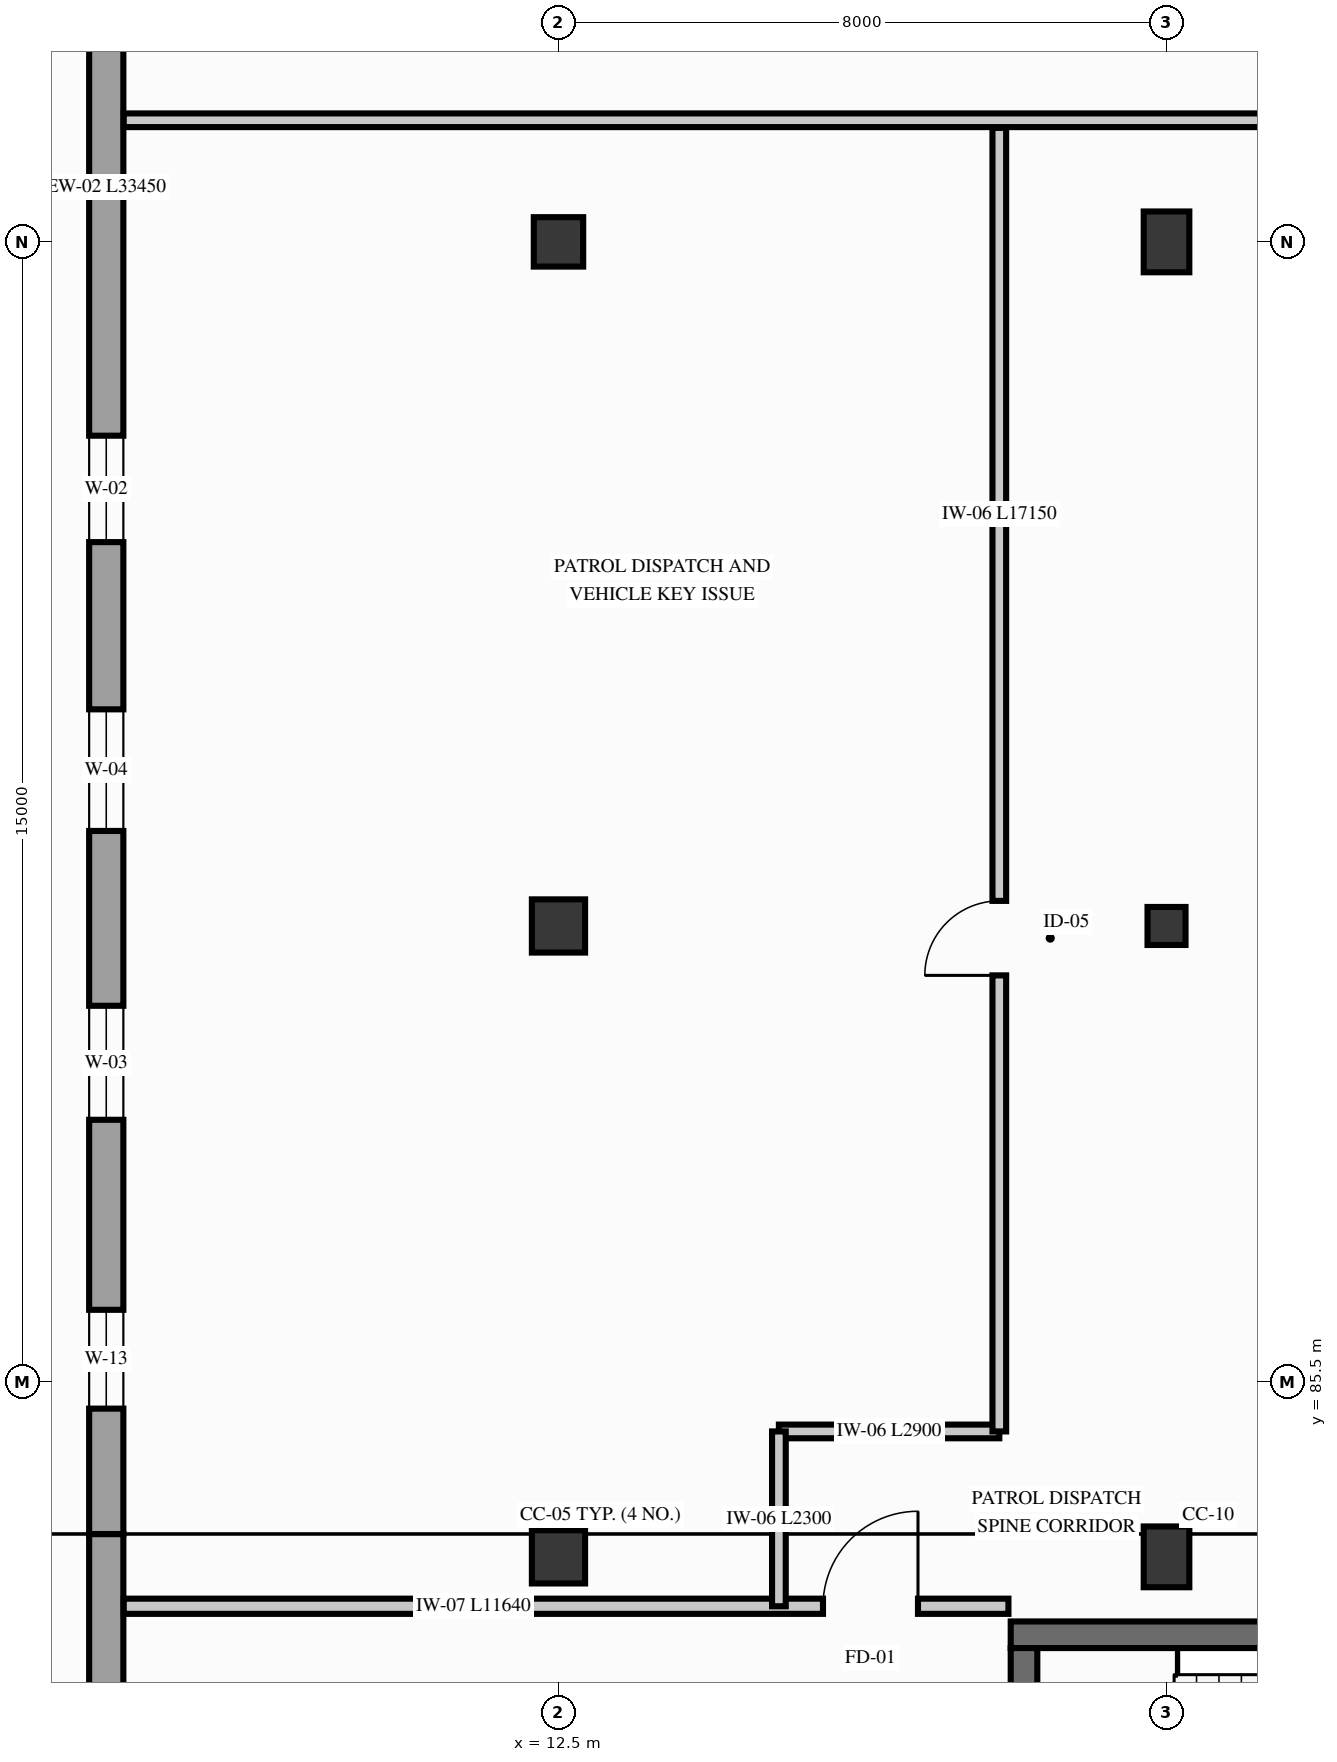
"""IFC4 building model, lengths in metres.
Left out: names, types, materials, properties, quantities, classifications, styles, units other than length and angle.
Written with IfcOpenShell. Run it as: python <this file> out.ifc"""

import sys

from ifc_helpers import new_model, si_unit, direction, frame, frame_2d, origin, origin_2d, place, context, subcontext, project, spatial, rectangle, extrude, element, fill, save


model = new_model("IFC4")
c1 = context("Model", 3, precision=1e-05, world=origin(), true_north=direction((0.0, 1.0)))
c2 = subcontext(c1, "Body", "Model", "MODEL_VIEW")
j1 = project(units=[si_unit("LENGTHUNIT", "METRE"), si_unit("PLANEANGLEUNIT", "RADIAN")], contexts=[c1])
p1 = place(None, origin())
s1 = spatial("IfcSite", under=j1, at=p1, CompositionType="ELEMENT")
p2 = place(p1, origin())
s2 = spatial("IfcBuilding", under=s1, at=p2, CompositionType="ELEMENT")
p3 = place(p2, origin())
s3 = spatial("IfcBuildingStorey", under=s2, at=p3, CompositionType="ELEMENT", Elevation=0.0)
p4 = place(p3, frame((18.45, 82.175, 0.0), z_axis=(0.0, 0.0, 1.0), x_axis=(1.0, 0.0, 0.0)))
e1 = element("IfcWall", 1, at=p4, inside=s3, PredefinedType="SHEAR", context=c2, shape_type="SweptSolid", body=[
    extrude(rectangle(XDim=8.3, YDim=0.35, at=frame_2d((4.15, 0.0))), origin(), (0.0, 0.0, 1.0), 4.88),
])
p5 = place(p3, frame((18.625, 75.2, 0.0), z_axis=(0.0, 0.0, 1.0), x_axis=(0.0, 1.0, 0.0)))
e2 = element("IfcWall", 2, at=p5, inside=s3, PredefinedType="SHEAR", context=c2, shape_type="SweptSolid", body=[
    extrude(rectangle(XDim=6.8, YDim=0.35, at=frame_2d((3.4, 0.0))), origin(), (0.0, 0.0, 1.0), 4.88),
])
p6 = place(p5, frame((2.6, 0.0, 0.0)))
e3 = element("IfcOpeningElement", 3, at=p6, cuts=e2, PredefinedType="OPENING", context=c2, shape_type="SweptSolid", body=[
    extrude(rectangle(XDim=1.32, YDim=2.24, at=frame_2d((0.66, 1.12))), frame((0.0, 0.185, 0.0), z_axis=(0.0, -1.0, 0.0), x_axis=(1.0, 0.0, 0.0)), (0.0, 0.0, 1.0), 0.37),
])
p7 = place(p3, frame((12.5, 83.2, 0.0), z_axis=(0.0, 0.0, 1.0), x_axis=(1.0, 0.0, 0.0)))
e4 = element("IfcColumn", 4, at=p7, inside=s3, PredefinedType="COLUMN", context=c2, shape_type="SweptSolid", body=[
    extrude(rectangle(XDim=0.7, YDim=0.7, at=origin_2d()), origin(), (0.0, 0.0, 1.0), 5.1),
])
p8 = place(p3, frame((20.5, 83.2, 0.0), z_axis=(0.0, 0.0, 1.0), x_axis=(1.0, 0.0, 0.0)))
e5 = element("IfcColumn", 5, at=p8, inside=s3, PredefinedType="COLUMN", context=c2, shape_type="SweptSolid", body=[
    extrude(rectangle(XDim=0.6, YDim=0.8, at=origin_2d()), origin(), (0.0, 0.0, 1.0), 5.1),
])
p9 = place(p3, frame((12.5, 91.5, 0.0), z_axis=(0.0, 0.0, 1.0), x_axis=(1.0, 0.0, 0.0)))
e6 = element("IfcColumn", 6, at=p9, inside=s3, PredefinedType="COLUMN", context=c2, shape_type="SweptSolid", body=[
    extrude(rectangle(XDim=0.7, YDim=0.7, at=origin_2d()), origin(), (0.0, 0.0, 1.0), 5.1),
])
p10 = place(p3, frame((12.5, 100.5, 0.0), z_axis=(0.0, 0.0, 1.0), x_axis=(1.0, 0.0, 0.0)))
e7 = element("IfcColumn", 7, at=p10, inside=s3, PredefinedType="COLUMN", context=c2, shape_type="SweptSolid", body=[
    extrude(rectangle(XDim=0.65, YDim=0.65, at=origin_2d()), origin(), (0.0, 0.0, 1.0), 5.1),
])
p11 = place(p3, frame((20.5, 91.5, 0.0), z_axis=(0.0, 0.0, 1.0), x_axis=(1.0, 0.0, 0.0)))
e8 = element("IfcColumn", 8, at=p11, inside=s3, PredefinedType="COLUMN", context=c2, shape_type="SweptSolid", body=[
    extrude(rectangle(XDim=0.5, YDim=0.5, at=origin_2d()), origin(), (0.0, 0.0, 1.0), 5.1),
])
p12 = place(p3, frame((20.5, 100.5, 0.0), z_axis=(0.0, 0.0, 1.0), x_axis=(1.0, 0.0, 0.0)))
e9 = element("IfcColumn", 9, at=p12, inside=s3, PredefinedType="COLUMN", context=c2, shape_type="SweptSolid", body=[
    extrude(rectangle(XDim=0.6, YDim=0.8, at=origin_2d()), origin(), (0.0, 0.0, 1.0), 5.1),
])
p13 = place(p3, frame((6.55, 36.5, 0.0), z_axis=(0.0, 0.0, 1.0), x_axis=(0.0, 1.0, 0.0)))
e10 = element("IfcWall", 10, at=p13, inside=s3, PredefinedType="SOLIDWALL", context=c2, shape_type="SweptSolid", body=[
    extrude(rectangle(XDim=47.0, YDim=0.45, at=frame_2d((23.5, 0.0))), origin(), (0.0, 0.0, 1.0), 4.368),
])
p14 = place(p13, frame((40.5, 0.0, 0.0)))
e11 = element("IfcOpeningElement", 11, at=p14, cuts=e10, PredefinedType="OPENING", context=c2, shape_type="SweptSolid", body=[
    extrude(rectangle(XDim=1.8, YDim=2.4, at=frame_2d((0.9, 1.2))), frame((0.0, 0.235, 0.0), z_axis=(0.0, -1.0, 0.0), x_axis=(1.0, 0.0, 0.0)), (0.0, 0.0, 1.0), 0.47),
])
p15 = place(p13, frame((1.65, 0.0, 0.85)))
e12 = element("IfcOpeningElement", 12, at=p15, cuts=e10, PredefinedType="OPENING", context=c2, shape_type="SweptSolid", body=[
    extrude(rectangle(XDim=1.6, YDim=2.4, at=frame_2d((0.8, 1.2))), frame((0.0, 0.235, 0.0), z_axis=(0.0, -1.0, 0.0), x_axis=(1.0, 0.0, 0.0)), (0.0, 0.0, 1.0), 0.47),
])
p16 = place(p13, frame((5.5, 0.0, 0.85)))
e13 = element("IfcOpeningElement", 13, at=p16, cuts=e10, PredefinedType="OPENING", context=c2, shape_type="SweptSolid", body=[
    extrude(rectangle(XDim=1.8, YDim=2.4, at=frame_2d((0.9, 1.2))), frame((0.0, 0.235, 0.0), z_axis=(0.0, -1.0, 0.0), x_axis=(1.0, 0.0, 0.0)), (0.0, 0.0, 1.0), 0.47),
])
p17 = place(p13, frame((9.35, 0.0, 0.85)))
e14 = element("IfcOpeningElement", 14, at=p17, cuts=e10, PredefinedType="OPENING", context=c2, shape_type="SweptSolid", body=[
    extrude(rectangle(XDim=1.5, YDim=2.3, at=frame_2d((0.75, 1.15))), frame((0.0, 0.235, 0.0), z_axis=(0.0, -1.0, 0.0), x_axis=(1.0, 0.0, 0.0)), (0.0, 0.0, 1.0), 0.47),
])
p18 = place(p13, frame((13.2, 0.0, 0.85)))
e15 = element("IfcOpeningElement", 15, at=p18, cuts=e10, PredefinedType="OPENING", context=c2, shape_type="SweptSolid", body=[
    extrude(rectangle(XDim=1.4, YDim=2.2, at=frame_2d((0.7, 1.1))), frame((0.0, 0.235, 0.0), z_axis=(0.0, -1.0, 0.0), x_axis=(1.0, 0.0, 0.0)), (0.0, 0.0, 1.0), 0.47),
])
p19 = place(p13, frame((24.75, 0.0, 0.85)))
e16 = element("IfcOpeningElement", 16, at=p19, cuts=e10, PredefinedType="OPENING", context=c2, shape_type="SweptSolid", body=[
    extrude(rectangle(XDim=1.6, YDim=2.4, at=frame_2d((0.8, 1.2))), frame((0.0, 0.235, 0.0), z_axis=(0.0, -1.0, 0.0), x_axis=(1.0, 0.0, 0.0)), (0.0, 0.0, 1.0), 0.47),
])
p20 = place(p13, frame((28.6, 0.0, 0.85)))
e17 = element("IfcOpeningElement", 17, at=p20, cuts=e10, PredefinedType="OPENING", context=c2, shape_type="SweptSolid", body=[
    extrude(rectangle(XDim=1.8, YDim=2.4, at=frame_2d((0.9, 1.2))), frame((0.0, 0.235, 0.0), z_axis=(0.0, -1.0, 0.0), x_axis=(1.0, 0.0, 0.0)), (0.0, 0.0, 1.0), 0.47),
])
p21 = place(p13, frame((32.45, 0.0, 0.85)))
e18 = element("IfcOpeningElement", 18, at=p21, cuts=e10, PredefinedType="OPENING", context=c2, shape_type="SweptSolid", body=[
    extrude(rectangle(XDim=1.5, YDim=2.3, at=frame_2d((0.75, 1.15))), frame((0.0, 0.235, 0.0), z_axis=(0.0, -1.0, 0.0), x_axis=(1.0, 0.0, 0.0)), (0.0, 0.0, 1.0), 0.47),
])
p22 = place(p3, frame((6.55, 83.5, 0.0), z_axis=(0.0, 0.0, 1.0), x_axis=(0.0, 1.0, 0.0)))
e19 = element("IfcWall", 19, at=p22, inside=s3, PredefinedType="SOLIDWALL", context=c2, shape_type="SweptSolid", body=[
    extrude(rectangle(XDim=33.45, YDim=0.45, at=frame_2d((16.725, 0.0))), origin(), (0.0, 0.0, 1.0), 4.418),
])
p23 = place(p22, frame((21.0, 0.0, 0.0)))
e20 = element("IfcOpeningElement", 20, at=p23, cuts=e19, PredefinedType="OPENING", context=c2, shape_type="SweptSolid", body=[
    extrude(rectangle(XDim=1.8, YDim=2.4, at=frame_2d((0.9, 1.2))), frame((0.0, 0.235, 0.0), z_axis=(0.0, -1.0, 0.0), x_axis=(1.0, 0.0, 0.0)), (0.0, 0.0, 1.0), 0.47),
])
p24 = place(p22, frame((1.65, 0.0, 0.85)))
e21 = element("IfcOpeningElement", 21, at=p24, cuts=e19, PredefinedType="OPENING", context=c2, shape_type="SweptSolid", body=[
    extrude(rectangle(XDim=1.3, YDim=2.15, at=frame_2d((0.65, 1.075))), frame((0.0, 0.235, 0.0), z_axis=(0.0, -1.0, 0.0), x_axis=(1.0, 0.0, 0.0)), (0.0, 0.0, 1.0), 0.47),
])
p25 = place(p22, frame((5.45, 0.0, 0.85)))
e22 = element("IfcOpeningElement", 22, at=p25, cuts=e19, PredefinedType="OPENING", context=c2, shape_type="SweptSolid", body=[
    extrude(rectangle(XDim=1.5, YDim=2.3, at=frame_2d((0.75, 1.15))), frame((0.0, 0.235, 0.0), z_axis=(0.0, -1.0, 0.0), x_axis=(1.0, 0.0, 0.0)), (0.0, 0.0, 1.0), 0.47),
])
p26 = place(p22, frame((9.25, 0.0, 0.85)))
e23 = element("IfcOpeningElement", 23, at=p26, cuts=e19, PredefinedType="OPENING", context=c2, shape_type="SweptSolid", body=[
    extrude(rectangle(XDim=1.6, YDim=2.4, at=frame_2d((0.8, 1.2))), frame((0.0, 0.235, 0.0), z_axis=(0.0, -1.0, 0.0), x_axis=(1.0, 0.0, 0.0)), (0.0, 0.0, 1.0), 0.47),
])
p27 = place(p22, frame((13.05, 0.0, 0.85)))
e24 = element("IfcOpeningElement", 24, at=p27, cuts=e19, PredefinedType="OPENING", context=c2, shape_type="SweptSolid", body=[
    extrude(rectangle(XDim=1.4, YDim=2.2, at=frame_2d((0.7, 1.1))), frame((0.0, 0.235, 0.0), z_axis=(0.0, -1.0, 0.0), x_axis=(1.0, 0.0, 0.0)), (0.0, 0.0, 1.0), 0.47),
])
p28 = place(p22, frame((24.45, 0.0, 0.85)))
e25 = element("IfcOpeningElement", 25, at=p28, cuts=e19, PredefinedType="OPENING", context=c2, shape_type="SweptSolid", body=[
    extrude(rectangle(XDim=1.9, YDim=2.45, at=frame_2d((0.95, 1.225))), frame((0.0, 0.235, 0.0), z_axis=(0.0, -1.0, 0.0), x_axis=(1.0, 0.0, 0.0)), (0.0, 0.0, 1.0), 0.47),
])
p29 = place(p22, frame((28.25, 0.0, 0.85)))
e26 = element("IfcOpeningElement", 26, at=p29, cuts=e19, PredefinedType="OPENING", context=c2, shape_type="SweptSolid", body=[
    extrude(rectangle(XDim=1.2, YDim=2.1, at=frame_2d((0.6, 1.05))), frame((0.0, 0.235, 0.0), z_axis=(0.0, -1.0, 0.0), x_axis=(1.0, 0.0, 0.0)), (0.0, 0.0, 1.0), 0.47),
])
p30 = place(p3, frame((6.78, 82.55, 0.0), z_axis=(0.0, 0.0, 1.0), x_axis=(1.0, 0.0, 0.0)))
e27 = element("IfcWall", 27, at=p30, inside=s3, PredefinedType="PARTITIONING", context=c2, shape_type="SweptSolid", body=[
    extrude(rectangle(XDim=11.64, YDim=0.2, at=frame_2d((5.82, 0.0))), origin(), (0.0, 0.0, 1.0), 4.378),
])
p31 = place(p30, frame((9.2, 0.0, 0.0)))
e28 = element("IfcOpeningElement", 28, at=p31, cuts=e27, PredefinedType="OPENING", context=c2, shape_type="SweptSolid", body=[
    extrude(rectangle(XDim=1.25, YDim=2.2, at=frame_2d((0.625, 1.1))), frame((0.0, 0.11, 0.0), z_axis=(0.0, -1.0, 0.0), x_axis=(1.0, 0.0, 0.0)), (0.0, 0.0, 1.0), 0.22),
])
p32 = place(p3, frame((15.4, 84.85, 0.0), z_axis=(0.0, 0.0, 1.0), x_axis=(1.0, 0.0, 0.0)))
e29 = element("IfcWall", 29, at=p32, inside=s3, PredefinedType="PARTITIONING", context=c2, shape_type="SweptSolid", body=[
    extrude(rectangle(XDim=2.9, YDim=0.18, at=frame_2d((1.45, 0.0))), origin(), (0.0, 0.0, 1.0), 4.86),
])
p33 = place(p3, frame((15.4, 82.55, 0.0), z_axis=(0.0, 0.0, 1.0), x_axis=(0.0, 1.0, 0.0)))
e30 = element("IfcWall", 30, at=p33, inside=s3, PredefinedType="PARTITIONING", context=c2, shape_type="SweptSolid", body=[
    extrude(rectangle(XDim=2.3, YDim=0.18, at=frame_2d((1.15, 0.0))), origin(), (0.0, 0.0, 1.0), 4.518),
])
p34 = place(p3, frame((18.3, 84.85, 0.0), z_axis=(0.0, 0.0, 1.0), x_axis=(0.0, 1.0, 0.0)))
e31 = element("IfcWall", 31, at=p34, inside=s3, PredefinedType="PARTITIONING", context=c2, shape_type="SweptSolid", body=[
    extrude(rectangle(XDim=17.15, YDim=0.18, at=frame_2d((8.575, 0.0))), origin(), (0.0, 0.0, 1.0), 4.558),
])
p35 = place(p34, frame((6.0, 0.0, 0.0)))
e32 = element("IfcOpeningElement", 32, at=p35, cuts=e31, PredefinedType="OPENING", context=c2, shape_type="SweptSolid", body=[
    extrude(rectangle(XDim=0.98, YDim=2.16, at=frame_2d((0.49, 1.08))), frame((0.0, 0.1, 0.0), z_axis=(0.0, -1.0, 0.0), x_axis=(1.0, 0.0, 0.0)), (0.0, 0.0, 1.0), 0.2),
])
p36 = place(p3, frame((6.78, 102.1, 0.0), z_axis=(0.0, 0.0, 1.0), x_axis=(1.0, 0.0, 0.0)))
e33 = element("IfcWall", 33, at=p36, inside=s3, PredefinedType="PARTITIONING", context=c2, shape_type="SweptSolid", body=[
    extrude(rectangle(XDim=21.27, YDim=0.18, at=frame_2d((10.635, 0.0))), origin(), (0.0, 0.0, 1.0), 4.428),
])
p37 = place(p36, frame((15.2, 0.0, 0.0)))
e34 = element("IfcOpeningElement", 34, at=p37, cuts=e33, PredefinedType="OPENING", context=c2, shape_type="SweptSolid", body=[
    extrude(rectangle(XDim=1.18, YDim=2.24, at=frame_2d((0.59, 1.12))), frame((0.0, 0.1, 0.0), z_axis=(0.0, -1.0, 0.0), x_axis=(1.0, 0.0, 0.0)), (0.0, 0.0, 1.0), 0.2),
])
p38 = place(p24, origin())
e35 = element("IfcWindow", 35, at=p38, inside=s3, PartitioningType="SINGLE_PANEL", PredefinedType="WINDOW", context=c2, shape_type="SweptSolid", body=[
    extrude(rectangle(XDim=1.3, YDim=2.15, at=frame_2d((0.65, 1.075))), frame((0.0, 0.03, 0.0), z_axis=(0.0, -1.0, 0.0), x_axis=(1.0, 0.0, 0.0)), (0.0, 0.0, 1.0), 0.06),
])
fill(e21, e35)
p39 = place(p25, origin())
e36 = element("IfcWindow", 36, at=p39, inside=s3, PartitioningType="SINGLE_PANEL", PredefinedType="WINDOW", context=c2, shape_type="SweptSolid", body=[
    extrude(rectangle(XDim=1.5, YDim=2.3, at=frame_2d((0.75, 1.15))), frame((0.0, 0.03, 0.0), z_axis=(0.0, -1.0, 0.0), x_axis=(1.0, 0.0, 0.0)), (0.0, 0.0, 1.0), 0.06),
])
fill(e22, e36)
p40 = place(p26, origin())
e37 = element("IfcWindow", 37, at=p40, inside=s3, PartitioningType="SINGLE_PANEL", PredefinedType="WINDOW", context=c2, shape_type="SweptSolid", body=[
    extrude(rectangle(XDim=1.6, YDim=2.4, at=frame_2d((0.8, 1.2))), frame((0.0, 0.03, 0.0), z_axis=(0.0, -1.0, 0.0), x_axis=(1.0, 0.0, 0.0)), (0.0, 0.0, 1.0), 0.06),
])
fill(e23, e37)
p41 = place(p27, origin())
e38 = element("IfcWindow", 38, at=p41, inside=s3, PartitioningType="SINGLE_PANEL", PredefinedType="WINDOW", context=c2, shape_type="SweptSolid", body=[
    extrude(rectangle(XDim=1.4, YDim=2.2, at=frame_2d((0.7, 1.1))), frame((0.0, 0.03, 0.0), z_axis=(0.0, -1.0, 0.0), x_axis=(1.0, 0.0, 0.0)), (0.0, 0.0, 1.0), 0.06),
])
fill(e24, e38)
p42 = place(p31, origin())
e39 = element("IfcDoor", 39, at=p42, inside=s3, OperationType="SINGLE_SWING_RIGHT", PredefinedType="DOOR", context=c2, shape_type="SweptSolid", body=[
    extrude(rectangle(XDim=1.25, YDim=2.2, at=frame_2d((0.625, 1.1))), frame((0.0, 0.025, 0.0), z_axis=(0.0, -1.0, 0.0), x_axis=(1.0, 0.0, 0.0)), (0.0, 0.0, 1.0), 0.05),
])
fill(e28, e39)
p43 = place(p35, origin())
e40 = element("IfcDoor", 40, at=p43, inside=s3, OperationType="SINGLE_SWING_LEFT", PredefinedType="DOOR", context=c2, shape_type="SweptSolid", body=[
    extrude(rectangle(XDim=0.98, YDim=2.16, at=frame_2d((0.49, 1.08))), frame((0.0, 0.025, 0.0), z_axis=(0.0, -1.0, 0.0), x_axis=(1.0, 0.0, 0.0)), (0.0, 0.0, 1.0), 0.05),
])
fill(e32, e40)
save(model, sys.argv[1])
